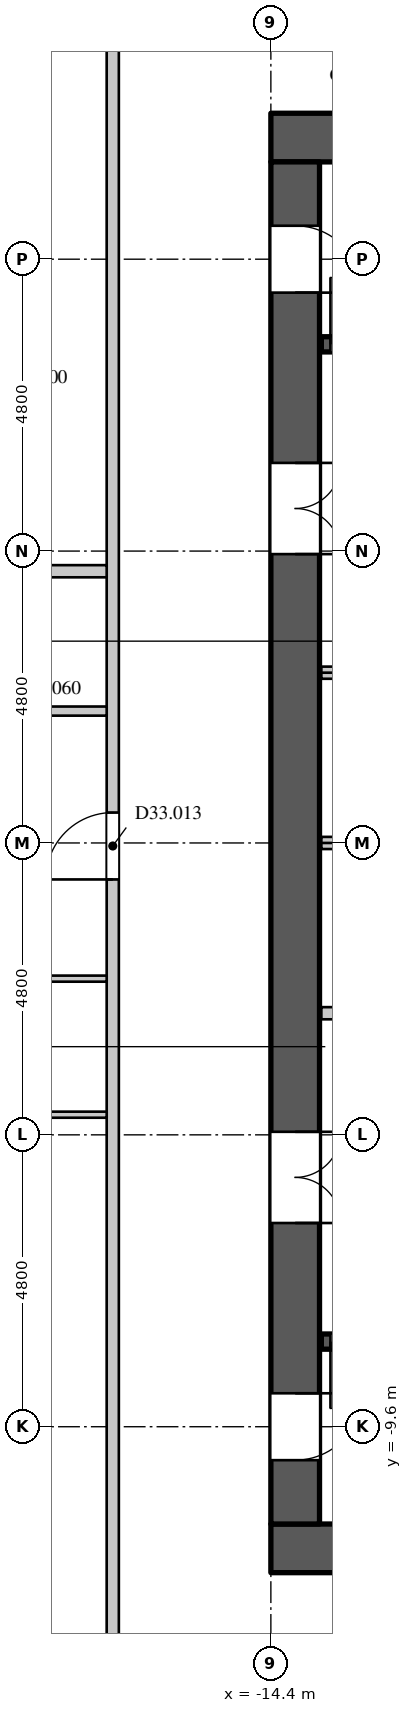
"""IFC4 building model, lengths in metres.
Left out: names, types, materials, properties, quantities, classifications, styles, units other than length and angle.
Written with IfcOpenShell. Run it as: python <this file> out.ifc"""

import sys

from ifc_helpers import new_model, si_unit, direction, frame, frame_2d, origin, place, context, subcontext, project, spatial, rectangle, extrude, element, fill, save


model = new_model("IFC4")
c1 = context("Model", 3, precision=1e-05, world=origin(), true_north=direction((0.0, 1.0)))
c2 = subcontext(c1, "Body", "Model", "MODEL_VIEW")
j1 = project(units=[si_unit("LENGTHUNIT", "METRE"), si_unit("PLANEANGLEUNIT", "RADIAN")], contexts=[c1])
p1 = place(None, origin())
s1 = spatial("IfcSite", under=j1, at=p1, CompositionType="ELEMENT")
p2 = place(p1, origin())
s2 = spatial("IfcBuilding", under=s1, at=p2, CompositionType="ELEMENT")
p3 = place(p2, frame((0.0, 0.0, 144.3)))
s3 = spatial("IfcBuildingStorey", under=s2, at=p3, CompositionType="ELEMENT", Elevation=144.3)
for number, where, z_axis, x_axis in (
    (1, (-14.4, 11.6, 0.0), (0.0, 0.0, 1.0), (1.0, 0.0, 0.0)),
    (2, (-14.4, -11.6, 0.0), (0.0, 0.0, 1.0), (1.0, 0.0, 0.0)),
):
    element("IfcWall", number, at=place(p3, frame(where, z_axis=z_axis, x_axis=x_axis)), inside=s3, PredefinedType="SHEAR", context=c2, shape_type="SweptSolid", body=[
        extrude(rectangle(XDim=28.8, YDim=0.8, at=frame_2d((14.4, 0.0))), origin(), (0.0, 0.0, 1.0), 4.2),
    ])
p4 = place(p3, frame((-14.0, -11.2, 0.0), z_axis=(0.0, 0.0, 1.0), x_axis=(0.0, 1.0, 0.0)))
e3 = element("IfcWall", 3, at=p4, inside=s3, PredefinedType="SHEAR", context=c2, shape_type="SweptSolid", body=[
    extrude(rectangle(XDim=22.4, YDim=0.8, at=frame_2d((11.2, 0.0))), origin(), (0.0, 0.0, 1.0), 4.2),
])
p5 = place(p4, frame((20.25, 0.0, 0.0)))
e4 = element("IfcOpeningElement", 4, at=p5, cuts=e3, PredefinedType="OPENING", context=c2, shape_type="SweptSolid", body=[
    extrude(rectangle(XDim=1.1, YDim=2.2, at=frame_2d((0.55, 1.1))), frame((0.0, 0.41, 0.0), z_axis=(0.0, -1.0, 0.0), x_axis=(1.0, 0.0, 0.0)), (0.0, 0.0, 1.0), 0.82),
])
p6 = place(p4, frame((1.05, 0.0, 0.0)))
e5 = element("IfcOpeningElement", 5, at=p6, cuts=e3, PredefinedType="OPENING", context=c2, shape_type="SweptSolid", body=[
    extrude(rectangle(XDim=1.1, YDim=2.2, at=frame_2d((0.55, 1.1))), frame((0.0, 0.41, 0.0), z_axis=(0.0, -1.0, 0.0), x_axis=(1.0, 0.0, 0.0)), (0.0, 0.0, 1.0), 0.82),
])
p7 = place(p4, frame((15.95, 0.0, 0.0)))
e6 = element("IfcOpeningElement", 6, at=p7, cuts=e3, PredefinedType="OPENING", context=c2, shape_type="SweptSolid", body=[
    extrude(rectangle(XDim=1.5, YDim=2.4, at=frame_2d((0.75, 1.2))), frame((0.0, 0.41, 0.0), z_axis=(0.0, -1.0, 0.0), x_axis=(1.0, 0.0, 0.0)), (0.0, 0.0, 1.0), 0.82),
])
p8 = place(p4, frame((4.95, 0.0, 0.0)))
e7 = element("IfcOpeningElement", 7, at=p8, cuts=e3, PredefinedType="OPENING", context=c2, shape_type="SweptSolid", body=[
    extrude(rectangle(XDim=1.5, YDim=2.4, at=frame_2d((0.75, 1.2))), frame((0.0, 0.41, 0.0), z_axis=(0.0, -1.0, 0.0), x_axis=(1.0, 0.0, 0.0)), (0.0, 0.0, 1.0), 0.82),
])
p9 = place(p3, frame((-17.0, -14.5, 0.0), z_axis=(0.0, 0.0, 1.0), x_axis=(0.0, 1.0, 0.0)))
e8 = element("IfcWall", 8, at=p9, inside=s3, PredefinedType="PARTITIONING", context=c2, shape_type="SweptSolid", body=[
    extrude(rectangle(XDim=29.0, YDim=0.2, at=frame_2d((14.5, 0.0))), origin(), (0.0, 0.0, 1.0), 3.798),
])
p10 = place(p9, frame((13.9, 0.0, 0.0)))
e9 = element("IfcOpeningElement", 9, at=p10, cuts=e8, PredefinedType="OPENING", context=c2, shape_type="SweptSolid", body=[
    extrude(rectangle(XDim=1.1, YDim=2.4, at=frame_2d((0.55, 1.2))), frame((0.0, 0.11, 0.0), z_axis=(0.0, -1.0, 0.0), x_axis=(1.0, 0.0, 0.0)), (0.0, 0.0, 1.0), 0.22),
])
p11 = place(p3, frame((-21.347, -11.388, 0.0), z_axis=(0.0, 0.0, 1.0), x_axis=(0.707106781187, -0.707106781187, 0.0)))
e10 = element("IfcWall", 10, at=p11, inside=s3, PredefinedType="PARTITIONING", context=c2, shape_type="SweptSolid", body=[
    extrude(rectangle(XDim=6.967, YDim=0.15, at=frame_2d((3.483, 0.0))), origin(), (0.0, 0.0, 1.0), 3.798),
])
p12 = place(p11, frame((2.75, 0.0, 0.0)))
e11 = element("IfcOpeningElement", 11, at=p12, cuts=e10, PredefinedType="OPENING", context=c2, shape_type="SweptSolid", body=[
    extrude(rectangle(XDim=0.95, YDim=2.2, at=frame_2d((0.475, 1.1))), frame((0.0, 0.085, 0.0), z_axis=(0.0, -1.0, 0.0), x_axis=(1.0, 0.0, 0.0)), (0.0, 0.0, 1.0), 0.17),
])
p13 = place(p3, frame((-21.347, 11.388, 0.0), z_axis=(0.0, 0.0, 1.0), x_axis=(0.707106781187, 0.707106781187, 0.0)))
e12 = element("IfcWall", 12, at=p13, inside=s3, PredefinedType="PARTITIONING", context=c2, shape_type="SweptSolid", body=[
    extrude(rectangle(XDim=8.836, YDim=0.15, at=frame_2d((4.418, 0.0))), origin(), (0.0, 0.0, 1.0), 3.798),
])
p14 = place(p13, frame((2.75, 0.0, 0.0)))
e13 = element("IfcOpeningElement", 13, at=p14, cuts=e12, PredefinedType="OPENING", context=c2, shape_type="SweptSolid", body=[
    extrude(rectangle(XDim=0.95, YDim=2.2, at=frame_2d((0.475, 1.1))), frame((0.0, 0.085, 0.0), z_axis=(0.0, -1.0, 0.0), x_axis=(1.0, 0.0, 0.0)), (0.0, 0.0, 1.0), 0.17),
])
p15 = place(p13, frame((7.45, 0.0, 0.0)))
e14 = element("IfcOpeningElement", 14, at=p15, cuts=e12, PredefinedType="OPENING", context=c2, shape_type="SweptSolid", body=[
    extrude(rectangle(XDim=0.95, YDim=2.2, at=frame_2d((0.475, 1.1))), frame((0.0, 0.085, 0.0), z_axis=(0.0, -1.0, 0.0), x_axis=(1.0, 0.0, 0.0)), (0.0, 0.0, 1.0), 0.17),
])
p16 = place(p3, frame((-20.725, 2.169, 0.0), z_axis=(0.0, 0.0, 1.0), x_axis=(1.0, 0.0, 0.0)))
e15 = element("IfcWall", 15, at=p16, inside=s3, PredefinedType="PARTITIONING", context=c2, shape_type="SweptSolid", body=[
    extrude(rectangle(XDim=3.625, YDim=0.15, at=frame_2d((1.812, 0.0))), origin(), (0.0, 0.0, 1.0), 3.798),
])
p17 = place(p16, frame((0.85, 0.0, 0.0)))
e16 = element("IfcOpeningElement", 16, at=p17, cuts=e15, PredefinedType="OPENING", context=c2, shape_type="SweptSolid", body=[
    extrude(rectangle(XDim=0.95, YDim=2.2, at=frame_2d((0.475, 1.1))), frame((0.0, 0.085, 0.0), z_axis=(0.0, -1.0, 0.0), x_axis=(1.0, 0.0, 0.0)), (0.0, 0.0, 1.0), 0.17),
])
p18 = place(p3, frame((-25.65, 4.469, 0.0), z_axis=(0.0, 0.0, 1.0), x_axis=(1.0, 0.0, 0.0)))
e17 = element("IfcWall", 17, at=p18, inside=s3, PredefinedType="PARTITIONING", context=c2, shape_type="SweptSolid", body=[
    extrude(rectangle(XDim=8.55, YDim=0.2, at=frame_2d((4.275, 0.0))), origin(), (0.0, 0.0, 1.0), 3.15),
])
p19 = place(p3, frame((-13.57, -2.8, 0.0), z_axis=(0.0, 0.0, 1.0), x_axis=(1.0, 0.0, 0.0)))
e18 = element("IfcWall", 18, at=p19, inside=s3, PredefinedType="PARTITIONING", context=c2, shape_type="SweptSolid", body=[
    extrude(rectangle(XDim=3.19, YDim=0.2, at=frame_2d((1.595, 0.0))), origin(), (0.0, 0.0, 1.0), 3.798),
])
p20 = place(p19, frame((1.25, 0.0, 0.0)))
e19 = element("IfcOpeningElement", 19, at=p20, cuts=e18, PredefinedType="OPENING", context=c2, shape_type="SweptSolid", body=[
    extrude(rectangle(XDim=0.6, YDim=2.0, at=frame_2d((0.3, 1.0))), frame((0.0, 0.11, 0.0), z_axis=(0.0, -1.0, 0.0), x_axis=(1.0, 0.0, 0.0)), (0.0, 0.0, 1.0), 0.22),
])
p21 = place(p3, frame((-13.57, 0.0, 0.0), z_axis=(0.0, 0.0, 1.0), x_axis=(1.0, 0.0, 0.0)))
e20 = element("IfcWall", 20, at=p21, inside=s3, PredefinedType="PARTITIONING", context=c2, shape_type="SweptSolid", body=[
    extrude(rectangle(XDim=23.97, YDim=0.2, at=frame_2d((11.985, 0.0))), origin(), (0.0, 0.0, 1.0), 3.798),
])
p22 = place(p3, frame((-13.57, 2.8, 0.0), z_axis=(0.0, 0.0, 1.0), x_axis=(1.0, 0.0, 0.0)))
e21 = element("IfcWall", 21, at=p22, inside=s3, PredefinedType="PARTITIONING", context=c2, shape_type="SweptSolid", body=[
    extrude(rectangle(XDim=23.97, YDim=0.2, at=frame_2d((11.985, 0.0))), origin(), (0.0, 0.0, 1.0), 3.798),
])
p23 = place(p22, frame((1.0, 0.0, 0.0)))
e22 = element("IfcOpeningElement", 22, at=p23, cuts=e21, PredefinedType="OPENING", context=c2, shape_type="SweptSolid", body=[
    extrude(rectangle(XDim=1.1, YDim=2.2, at=frame_2d((0.55, 1.1))), frame((0.0, 0.11, 0.0), z_axis=(0.0, -1.0, 0.0), x_axis=(1.0, 0.0, 0.0)), (0.0, 0.0, 1.0), 0.22),
])
p24 = place(p22, frame((3.9, 0.0, 0.0)))
e23 = element("IfcOpeningElement", 23, at=p24, cuts=e21, PredefinedType="OPENING", context=c2, shape_type="SweptSolid", body=[
    extrude(rectangle(XDim=1.1, YDim=2.2, at=frame_2d((0.55, 1.1))), frame((0.0, 0.11, 0.0), z_axis=(0.0, -1.0, 0.0), x_axis=(1.0, 0.0, 0.0)), (0.0, 0.0, 1.0), 0.22),
])
p25 = place(p22, frame((6.5, 0.0, 0.0)))
e24 = element("IfcOpeningElement", 24, at=p25, cuts=e21, PredefinedType="OPENING", context=c2, shape_type="SweptSolid", body=[
    extrude(rectangle(XDim=1.1, YDim=2.2, at=frame_2d((0.55, 1.1))), frame((0.0, 0.11, 0.0), z_axis=(0.0, -1.0, 0.0), x_axis=(1.0, 0.0, 0.0)), (0.0, 0.0, 1.0), 0.22),
])
p26 = place(p22, frame((9.1, 0.0, 0.0)))
e25 = element("IfcOpeningElement", 25, at=p26, cuts=e21, PredefinedType="OPENING", context=c2, shape_type="SweptSolid", body=[
    extrude(rectangle(XDim=1.1, YDim=2.2, at=frame_2d((0.55, 1.1))), frame((0.0, 0.11, 0.0), z_axis=(0.0, -1.0, 0.0), x_axis=(1.0, 0.0, 0.0)), (0.0, 0.0, 1.0), 0.22),
])
p27 = place(p22, frame((11.7, 0.0, 0.0)))
e26 = element("IfcOpeningElement", 26, at=p27, cuts=e21, PredefinedType="OPENING", context=c2, shape_type="SweptSolid", body=[
    extrude(rectangle(XDim=1.1, YDim=2.2, at=frame_2d((0.55, 1.1))), frame((0.0, 0.11, 0.0), z_axis=(0.0, -1.0, 0.0), x_axis=(1.0, 0.0, 0.0)), (0.0, 0.0, 1.0), 0.22),
])
p28 = place(p22, frame((14.3, 0.0, 0.0)))
e27 = element("IfcOpeningElement", 27, at=p28, cuts=e21, PredefinedType="OPENING", context=c2, shape_type="SweptSolid", body=[
    extrude(rectangle(XDim=1.1, YDim=2.2, at=frame_2d((0.55, 1.1))), frame((0.0, 0.11, 0.0), z_axis=(0.0, -1.0, 0.0), x_axis=(1.0, 0.0, 0.0)), (0.0, 0.0, 1.0), 0.22),
])
p29 = place(p22, frame((16.9, 0.0, 0.0)))
e28 = element("IfcOpeningElement", 28, at=p29, cuts=e21, PredefinedType="OPENING", context=c2, shape_type="SweptSolid", body=[
    extrude(rectangle(XDim=1.1, YDim=2.2, at=frame_2d((0.55, 1.1))), frame((0.0, 0.11, 0.0), z_axis=(0.0, -1.0, 0.0), x_axis=(1.0, 0.0, 0.0)), (0.0, 0.0, 1.0), 0.22),
])
p30 = place(p22, frame((19.5, 0.0, 0.0)))
e29 = element("IfcOpeningElement", 29, at=p30, cuts=e21, PredefinedType="OPENING", context=c2, shape_type="SweptSolid", body=[
    extrude(rectangle(XDim=1.1, YDim=2.2, at=frame_2d((0.55, 1.1))), frame((0.0, 0.11, 0.0), z_axis=(0.0, -1.0, 0.0), x_axis=(1.0, 0.0, 0.0)), (0.0, 0.0, 1.0), 0.22),
])
p31 = place(p3, frame((-13.57, -8.2, 0.0), z_axis=(0.0, 0.0, 1.0), x_axis=(1.0, 0.0, 0.0)))
e30 = element("IfcWall", 30, at=p31, inside=s3, PredefinedType="SHEAR", context=c2, shape_type="SweptSolid", body=[
    extrude(rectangle(XDim=8.295, YDim=0.25, at=frame_2d((4.147, 0.0))), origin(), (0.0, 0.0, 1.0), 3.798),
])
p32 = place(p31, frame((0.15, 0.0, 0.0)))
e31 = element("IfcOpeningElement", 31, at=p32, cuts=e30, PredefinedType="OPENING", context=c2, shape_type="SweptSolid", body=[
    extrude(rectangle(XDim=1.1, YDim=2.2, at=frame_2d((0.55, 1.1))), frame((0.0, 0.135, 0.0), z_axis=(0.0, -1.0, 0.0), x_axis=(1.0, 0.0, 0.0)), (0.0, 0.0, 1.0), 0.27),
])
p33 = place(p3, frame((-13.57, 8.2, 0.0), z_axis=(0.0, 0.0, 1.0), x_axis=(1.0, 0.0, 0.0)))
e32 = element("IfcWall", 32, at=p33, inside=s3, PredefinedType="SHEAR", context=c2, shape_type="SweptSolid", body=[
    extrude(rectangle(XDim=8.295, YDim=0.25, at=frame_2d((4.147, 0.0))), origin(), (0.0, 0.0, 1.0), 3.798),
])
p34 = place(p33, frame((0.15, 0.0, 0.0)))
e33 = element("IfcOpeningElement", 33, at=p34, cuts=e32, PredefinedType="OPENING", context=c2, shape_type="SweptSolid", body=[
    extrude(rectangle(XDim=1.1, YDim=2.2, at=frame_2d((0.55, 1.1))), frame((0.0, 0.135, 0.0), z_axis=(0.0, -1.0, 0.0), x_axis=(1.0, 0.0, 0.0)), (0.0, 0.0, 1.0), 0.27),
])
p35 = place(p3, frame((-20.8, -4.469, 0.0), z_axis=(0.0, 0.0, 1.0), x_axis=(1.0, 0.0, 0.0)))
e34 = element("IfcWall", 34, at=p35, inside=s3, PredefinedType="PARTITIONING", context=c2, shape_type="SweptSolid", body=[
    extrude(rectangle(XDim=3.7, YDim=0.1, at=frame_2d((1.85, 0.0))), origin(), (0.0, 0.0, 1.0), 3.15),
])
p36 = place(p35, frame((0.95, 0.0, 0.0)))
e35 = element("IfcOpeningElement", 35, at=p36, cuts=e34, PredefinedType="OPENING", context=c2, shape_type="SweptSolid", body=[
    extrude(rectangle(XDim=0.9, YDim=2.2, at=frame_2d((0.45, 1.1))), frame((0.0, 0.06, 0.0), z_axis=(0.0, -1.0, 0.0), x_axis=(1.0, 0.0, 0.0)), (0.0, 0.0, 1.0), 0.12),
])
p37 = place(p3, frame((-20.725, -2.231, 0.0), z_axis=(0.0, 0.0, 1.0), x_axis=(1.0, 0.0, 0.0)))
e36 = element("IfcWall", 36, at=p37, inside=s3, PredefinedType="PARTITIONING", context=c2, shape_type="SweptSolid", body=[
    extrude(rectangle(XDim=3.625, YDim=0.1, at=frame_2d((1.812, 0.0))), origin(), (0.0, 0.0, 1.0), 3.798),
])
p38 = place(p37, frame((0.85, 0.0, 0.0)))
e37 = element("IfcOpeningElement", 37, at=p38, cuts=e36, PredefinedType="OPENING", context=c2, shape_type="SweptSolid", body=[
    extrude(rectangle(XDim=0.9, YDim=2.2, at=frame_2d((0.45, 1.1))), frame((0.0, 0.06, 0.0), z_axis=(0.0, -1.0, 0.0), x_axis=(1.0, 0.0, 0.0)), (0.0, 0.0, 1.0), 0.12),
])
p39 = place(p34, origin())
e38 = element("IfcDoor", 38, at=p39, inside=s3, OperationType="SINGLE_SWING_LEFT", PredefinedType="DOOR", context=c2, shape_type="SweptSolid", body=[
    extrude(rectangle(XDim=1.1, YDim=2.2, at=frame_2d((0.55, 1.1))), frame((0.0, 0.025, 0.0), z_axis=(0.0, -1.0, 0.0), x_axis=(1.0, 0.0, 0.0)), (0.0, 0.0, 1.0), 0.05),
])
fill(e33, e38)
p40 = place(p32, origin())
e39 = element("IfcDoor", 39, at=p40, inside=s3, OperationType="SINGLE_SWING_RIGHT", PredefinedType="DOOR", context=c2, shape_type="SweptSolid", body=[
    extrude(rectangle(XDim=1.1, YDim=2.2, at=frame_2d((0.55, 1.1))), frame((0.0, 0.025, 0.0), z_axis=(0.0, -1.0, 0.0), x_axis=(1.0, 0.0, 0.0)), (0.0, 0.0, 1.0), 0.05),
])
fill(e31, e39)
p41 = place(p5, origin())
e40 = element("IfcDoor", 40, at=p41, inside=s3, OperationType="SINGLE_SWING_RIGHT", PredefinedType="DOOR", context=c2, shape_type="SweptSolid", body=[
    extrude(rectangle(XDim=1.1, YDim=2.2, at=frame_2d((0.55, 1.1))), frame((0.0, -0.345, 0.0), z_axis=(0.0, -1.0, 0.0), x_axis=(1.0, 0.0, 0.0)), (0.0, 0.0, 1.0), 0.05),
])
fill(e4, e40)
p42 = place(p6, origin())
e41 = element("IfcDoor", 41, at=p42, inside=s3, OperationType="SINGLE_SWING_LEFT", PredefinedType="DOOR", context=c2, shape_type="SweptSolid", body=[
    extrude(rectangle(XDim=1.1, YDim=2.2, at=frame_2d((0.55, 1.1))), frame((0.0, -0.345, 0.0), z_axis=(0.0, -1.0, 0.0), x_axis=(1.0, 0.0, 0.0)), (0.0, 0.0, 1.0), 0.05),
])
fill(e5, e41)
p43 = place(p7, origin())
e42 = element("IfcDoor", 42, at=p43, inside=s3, OperationType="DOUBLE_DOOR_SINGLE_SWING", PredefinedType="DOOR", context=c2, shape_type="SweptSolid", body=[
    extrude(rectangle(XDim=1.5, YDim=2.4, at=frame_2d((0.75, 1.2))), frame((0.0, -0.345, 0.0), z_axis=(0.0, -1.0, 0.0), x_axis=(1.0, 0.0, 0.0)), (0.0, 0.0, 1.0), 0.05),
])
fill(e6, e42)
p44 = place(p8, origin())
e43 = element("IfcDoor", 43, at=p44, inside=s3, OperationType="DOUBLE_DOOR_SINGLE_SWING", PredefinedType="DOOR", context=c2, shape_type="SweptSolid", body=[
    extrude(rectangle(XDim=1.5, YDim=2.4, at=frame_2d((0.75, 1.2))), frame((0.0, -0.345, 0.0), z_axis=(0.0, -1.0, 0.0), x_axis=(1.0, 0.0, 0.0)), (0.0, 0.0, 1.0), 0.05),
])
fill(e7, e43)
p45 = place(p10, origin())
e44 = element("IfcDoor", 44, at=p45, inside=s3, OperationType="SINGLE_SWING_LEFT", PredefinedType="DOOR", context=c2, shape_type="SweptSolid", body=[
    extrude(rectangle(XDim=1.1, YDim=2.4, at=frame_2d((0.55, 1.2))), frame((0.0, 0.025, 0.0), z_axis=(0.0, -1.0, 0.0), x_axis=(1.0, 0.0, 0.0)), (0.0, 0.0, 1.0), 0.05),
])
fill(e9, e44)
save(model, sys.argv[1])
